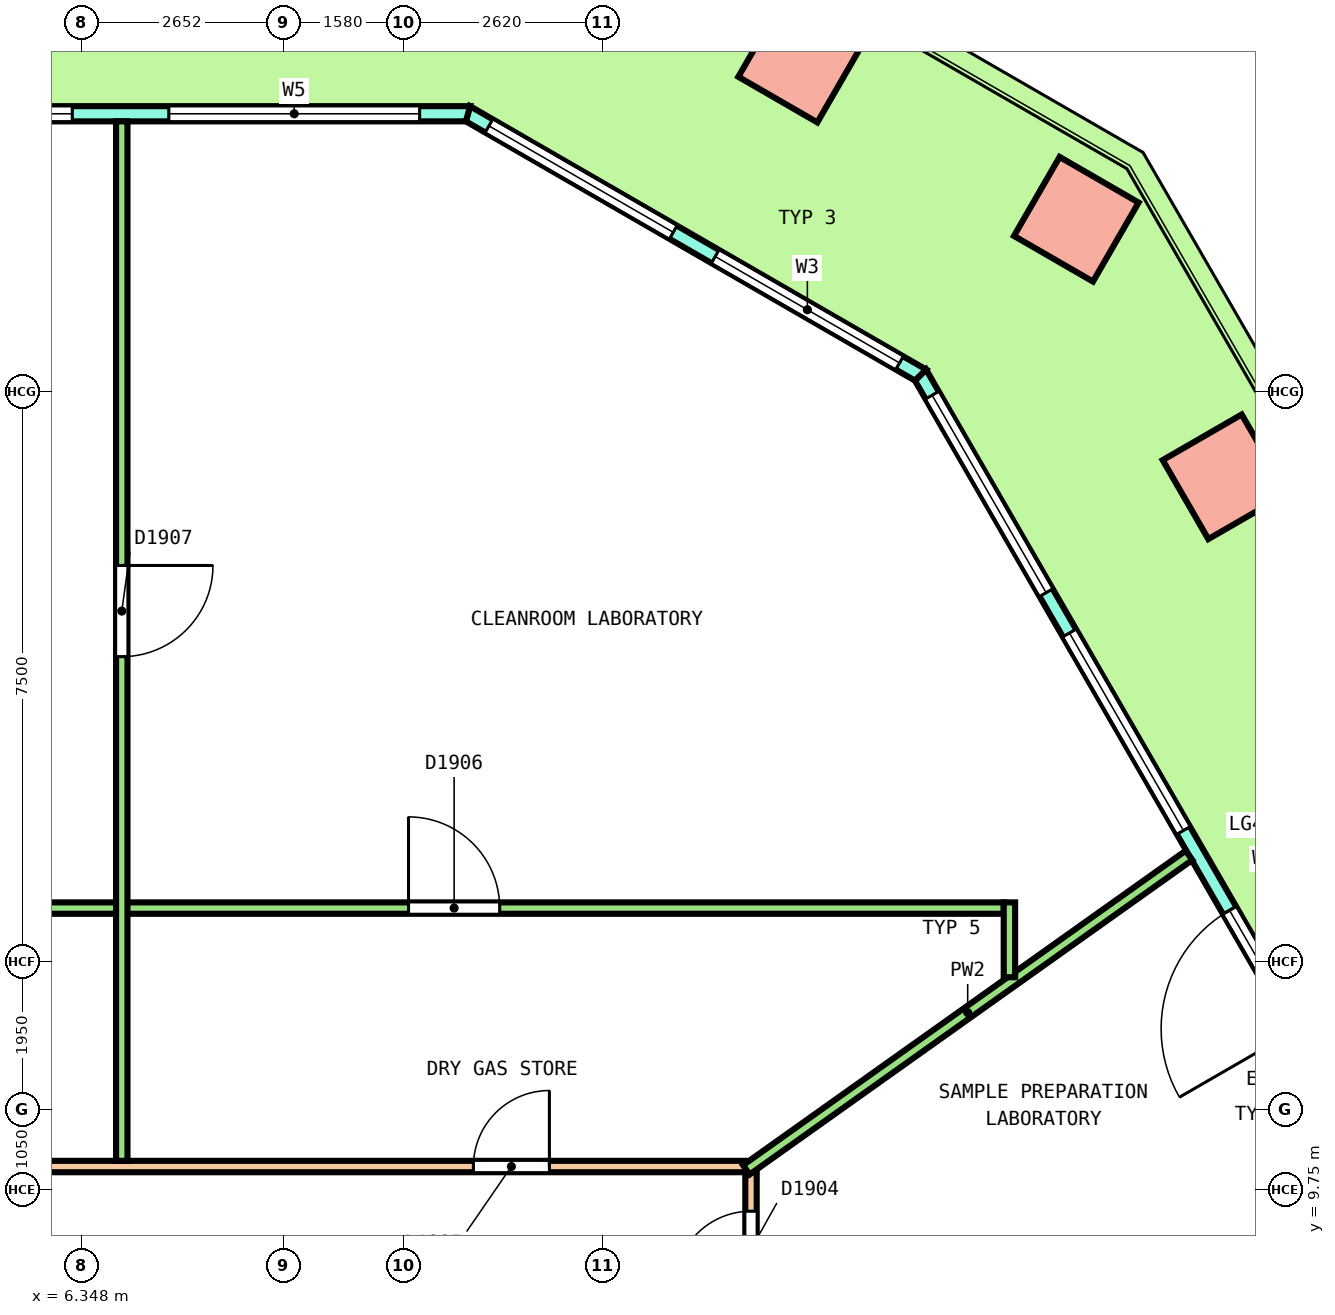
"""IFC4 building model, lengths in metres.
Left out: names, types, materials, properties, quantities, classifications, styles, units other than length and angle.
Written with IfcOpenShell. Run it as: python <this file> out.ifc"""

import sys

from ifc_helpers import new_model, si_unit, direction, frame, frame_2d, origin, origin_2d, place, context, subcontext, project, spatial, polyline, rectangle, outline, extrude, element, fill, save


model = new_model("IFC4")
c1 = context("Model", 3, precision=1e-05, world=origin(), true_north=direction((0.0, 1.0)))
c2 = subcontext(c1, "Body", "Model", "MODEL_VIEW")
j1 = project(units=[si_unit("LENGTHUNIT", "METRE"), si_unit("PLANEANGLEUNIT", "RADIAN")], contexts=[c1])
p1 = place(None, origin())
s1 = spatial("IfcSite", under=j1, at=p1, CompositionType="ELEMENT")
p2 = place(p1, origin())
s2 = spatial("IfcBuilding", under=s1, at=p2, CompositionType="ELEMENT")
p3 = place(p2, frame((0.0, 0.0, 193.6)))
s3 = spatial("IfcBuildingStorey", under=s2, at=p3, CompositionType="ELEMENT", Elevation=193.6)
for number, where, z_axis, x_axis in (
    (1, (21.386, 19.124, 0.0), (0.0, 0.0, 1.0), (-0.5, 0.866, 0.0)),
    (2, (19.43, 22.512, 0.0), (0.0, 0.0, 1.0), (-0.866, 0.5, 0.0)),
    (3, (15.803, 24.606, 0.0), (0.0, 0.0, 1.0), (-0.866, 0.5, 0.0)),
):
    element("IfcColumn", number, at=place(p3, frame(where, z_axis=z_axis, x_axis=x_axis)), inside=s3, PredefinedType="COLUMN", context=c2, shape_type="SweptSolid", body=[
        extrude(rectangle(XDim=1.2, YDim=1.2, at=origin_2d()), origin(), (0.0, 0.0, 1.0), 4.04),
    ])
p4 = place(p3, frame((26.411, 4.82, 0.0), z_axis=(0.0, 0.0, 1.0), x_axis=(-0.500000137386, 0.866025324465, 0.0)))
e4 = element("IfcWall", 4, at=p4, inside=s3, PredefinedType="SOLIDWALL", context=c2, shape_type="SweptSolid", body=[
    extrude(outline(polyline([(-0.027, -0.1), (0.979, -0.1), (1.986, -0.1), (2.992, -0.1), (3.999, -0.1), (5.005, -0.1), (6.012, -0.1), (7.018, -0.1), (8.025, -0.1), (9.031, -0.1), (10.038, -0.1), (11.044, -0.1), (12.051, -0.1), (13.057, -0.1), (14.063, -0.1), (15.07, -0.1), (16.076, -0.1), (17.083, -0.1), (18.089, -0.1), (18.036, 0.1), (17.035, 0.1), (16.035, 0.1), (15.034, 0.1), (14.034, 0.1), (13.033, 0.1), (12.033, 0.1), (11.032, 0.1), (10.032, 0.1), (9.031, 0.1), (8.031, 0.1), (7.03, 0.1), (6.03, 0.1), (5.029, 0.1), (4.029, 0.1), (3.028, 0.1), (2.028, 0.1), (1.027, 0.1), (0.027, 0.1), (-0.027, -0.1)])), origin(), (0.0, 0.0, 1.0), 4.1),
])
p5 = place(p4, frame((0.306, 0.0, 0.1)))
e5 = element("IfcOpeningElement", 5, at=p5, cuts=e4, PredefinedType="OPENING", context=c2, shape_type="SweptSolid", body=[
    extrude(rectangle(XDim=3.0, YDim=2.9, at=frame_2d((1.5, 1.45))), frame((0.0, 0.11, 0.0), z_axis=(0.0, -1.0, 0.0), x_axis=(1.0, 0.0, 0.0)), (0.0, 0.0, 1.0), 0.22),
])
p6 = place(p4, frame((3.919, 0.0, 0.1)))
e6 = element("IfcOpeningElement", 6, at=p6, cuts=e4, PredefinedType="OPENING", context=c2, shape_type="SweptSolid", body=[
    extrude(rectangle(XDim=3.0, YDim=2.9, at=frame_2d((1.5, 1.45))), frame((0.0, 0.11, 0.0), z_axis=(0.0, -1.0, 0.0), x_axis=(1.0, 0.0, 0.0)), (0.0, 0.0, 1.0), 0.22),
])
p7 = place(p4, frame((8.131, 0.0, 0.0)))
e7 = element("IfcOpeningElement", 7, at=p7, cuts=e4, PredefinedType="OPENING", context=c2, shape_type="SweptSolid", body=[
    extrude(rectangle(XDim=1.8, YDim=2.4, at=frame_2d((0.9, 1.2))), frame((0.0, 0.11, 0.0), z_axis=(0.0, -1.0, 0.0), x_axis=(1.0, 0.0, 0.0)), (0.0, 0.0, 1.0), 0.22),
])
p8 = place(p4, frame((8.131, 0.0, 2.55)))
e8 = element("IfcOpeningElement", 8, at=p8, cuts=e4, PredefinedType="OPENING", context=c2, shape_type="SweptSolid", body=[
    extrude(rectangle(XDim=1.8, YDim=0.45, at=frame_2d((0.9, 0.225))), frame((0.0, 0.11, 0.0), z_axis=(0.0, -1.0, 0.0), x_axis=(1.0, 0.0, 0.0)), (0.0, 0.0, 1.0), 0.22),
])
p9 = place(p4, frame((11.144, 0.0, 0.1)))
e9 = element("IfcOpeningElement", 9, at=p9, cuts=e4, PredefinedType="OPENING", context=c2, shape_type="SweptSolid", body=[
    extrude(rectangle(XDim=3.0, YDim=2.9, at=frame_2d((1.5, 1.45))), frame((0.0, 0.11, 0.0), z_axis=(0.0, -1.0, 0.0), x_axis=(1.0, 0.0, 0.0)), (0.0, 0.0, 1.0), 0.22),
])
p10 = place(p4, frame((14.756, 0.0, 0.1)))
e10 = element("IfcOpeningElement", 10, at=p10, cuts=e4, PredefinedType="OPENING", context=c2, shape_type="SweptSolid", body=[
    extrude(rectangle(XDim=3.0, YDim=2.9, at=frame_2d((1.5, 1.45))), frame((0.0, 0.11, 0.0), z_axis=(0.0, -1.0, 0.0), x_axis=(1.0, 0.0, 0.0)), (0.0, 0.0, 1.0), 0.22),
])
p11 = place(p3, frame((17.38, 20.463, 0.0), z_axis=(0.0, 0.0, 1.0), x_axis=(-0.866029458321, 0.49999297727, 0.0)))
e11 = element("IfcWall", 11, at=p11, inside=s3, PredefinedType="SOLIDWALL", context=c2, shape_type="SweptSolid", body=[
    extrude(outline(polyline([(-0.027, -0.1), (1.128, -0.1), (2.282, -0.1), (3.437, -0.1), (4.592, -0.1), (5.747, -0.1), (6.901, -0.1), (6.848, 0.1), (5.711, 0.1), (4.574, 0.1), (3.437, 0.1), (2.301, 0.1), (1.164, 0.1), (0.027, 0.1), (-0.027, -0.1)])), origin(), (0.0, 0.0, 1.0), 4.1),
])
p12 = place(p11, frame((0.319, 0.0, 0.1)))
e12 = element("IfcOpeningElement", 12, at=p12, cuts=e11, PredefinedType="OPENING", context=c2, shape_type="SweptSolid", body=[
    extrude(rectangle(XDim=2.8, YDim=2.9, at=frame_2d((1.4, 1.45))), frame((0.0, 0.11, 0.0), z_axis=(0.0, -1.0, 0.0), x_axis=(1.0, 0.0, 0.0)), (0.0, 0.0, 1.0), 0.22),
])
p13 = place(p11, frame((3.756, 0.0, 0.1)))
e13 = element("IfcOpeningElement", 13, at=p13, cuts=e11, PredefinedType="OPENING", context=c2, shape_type="SweptSolid", body=[
    extrude(rectangle(XDim=2.8, YDim=2.9, at=frame_2d((1.4, 1.45))), frame((0.0, 0.11, 0.0), z_axis=(0.0, -1.0, 0.0), x_axis=(1.0, 0.0, 0.0)), (0.0, 0.0, 1.0), 0.22),
])
p14 = place(p3, frame((11.426, 23.9, 0.0), z_axis=(0.0, 0.0, 1.0), x_axis=(-1.0, 0.0, 0.0)))
e14 = element("IfcWall", 14, at=p14, inside=s3, PredefinedType="SOLIDWALL", context=c2, shape_type="SweptSolid", body=[
    extrude(outline(polyline([(-0.027, -0.1), (1.014, -0.1), (2.055, -0.1), (3.097, -0.1), (4.138, -0.1), (5.179, -0.1), (6.22, -0.1), (7.261, -0.1), (8.303, -0.1), (9.344, -0.1), (10.385, -0.1), (11.426, -0.1), (12.468, -0.1), (13.509, -0.1), (14.55, -0.1), (15.591, -0.1), (16.632, -0.1), (17.673, -0.1), (18.715, -0.1), (19.756, -0.1), (20.797, -0.1), (21.838, -0.1), (22.879, -0.1), (22.826, 0.1), (21.789, 0.1), (20.753, 0.1), (19.717, 0.1), (18.68, 0.1), (17.644, 0.1), (16.608, 0.1), (15.572, 0.1), (14.535, 0.1), (13.499, 0.1), (12.463, 0.1), (11.426, 0.1), (10.39, 0.1), (9.354, 0.1), (8.317, 0.1), (7.281, 0.1), (6.245, 0.1), (5.208, 0.1), (4.172, 0.1), (3.136, 0.1), (2.099, 0.1), (1.063, 0.1), (0.027, 0.1), (-0.027, -0.1)])), origin(), (0.0, 0.0, 1.0), 4.1),
])
p15 = place(p14, frame((0.635, 0.0, 0.1)))
e15 = element("IfcOpeningElement", 15, at=p15, cuts=e14, PredefinedType="OPENING", context=c2, shape_type="SweptSolid", body=[
    extrude(rectangle(XDim=3.3, YDim=2.9, at=frame_2d((1.65, 1.45))), frame((0.0, 0.11, 0.0), z_axis=(0.0, -1.0, 0.0), x_axis=(1.0, 0.0, 0.0)), (0.0, 0.0, 1.0), 0.22),
])
p16 = place(p14, frame((5.206, 0.0, 0.1)))
e16 = element("IfcOpeningElement", 16, at=p16, cuts=e14, PredefinedType="OPENING", context=c2, shape_type="SweptSolid", body=[
    extrude(rectangle(XDim=3.3, YDim=2.9, at=frame_2d((1.65, 1.45))), frame((0.0, 0.11, 0.0), z_axis=(0.0, -1.0, 0.0), x_axis=(1.0, 0.0, 0.0)), (0.0, 0.0, 1.0), 0.22),
])
p17 = place(p14, frame((10.526, 0.0, 0.0)))
e17 = element("IfcOpeningElement", 17, at=p17, cuts=e14, PredefinedType="OPENING", context=c2, shape_type="SweptSolid", body=[
    extrude(rectangle(XDim=1.8, YDim=2.4, at=frame_2d((0.9, 1.2))), frame((0.0, 0.11, 0.0), z_axis=(0.0, -1.0, 0.0), x_axis=(1.0, 0.0, 0.0)), (0.0, 0.0, 1.0), 0.22),
])
p18 = place(p14, frame((10.526, 0.0, 2.55)))
e18 = element("IfcOpeningElement", 18, at=p18, cuts=e14, PredefinedType="OPENING", context=c2, shape_type="SweptSolid", body=[
    extrude(rectangle(XDim=1.8, YDim=0.45, at=frame_2d((0.9, 0.225))), frame((0.0, 0.11, 0.0), z_axis=(0.0, -1.0, 0.0), x_axis=(1.0, 0.0, 0.0)), (0.0, 0.0, 1.0), 0.22),
])
p19 = place(p14, frame((14.347, 0.0, 0.1)))
e19 = element("IfcOpeningElement", 19, at=p19, cuts=e14, PredefinedType="OPENING", context=c2, shape_type="SweptSolid", body=[
    extrude(rectangle(XDim=3.3, YDim=2.9, at=frame_2d((1.65, 1.45))), frame((0.0, 0.11, 0.0), z_axis=(0.0, -1.0, 0.0), x_axis=(1.0, 0.0, 0.0)), (0.0, 0.0, 1.0), 0.22),
])
p20 = place(p14, frame((18.917, 0.0, 0.1)))
e20 = element("IfcOpeningElement", 20, at=p20, cuts=e14, PredefinedType="OPENING", context=c2, shape_type="SweptSolid", body=[
    extrude(rectangle(XDim=3.3, YDim=2.9, at=frame_2d((1.65, 1.45))), frame((0.0, 0.11, 0.0), z_axis=(0.0, -1.0, 0.0), x_axis=(1.0, 0.0, 0.0)), (0.0, 0.0, 1.0), 0.22),
])
p21 = place(p3, frame((15.15, 0.576, 0.0), z_axis=(0.0, 0.0, 1.0), x_axis=(0.0, 1.0, 0.0)))
e21 = element("IfcWall", 21, at=p21, inside=s3, PredefinedType="PARTITIONING", context=c2, shape_type="SweptSolid", body=[
    extrude(rectangle(XDim=9.399, YDim=0.15, at=frame_2d((4.7, 0.0))), origin(), (0.0, 0.0, 1.0), 3.05),
])
p22 = place(p21, frame((7.887, 0.0, 0.0)))
e22 = element("IfcOpeningElement", 22, at=p22, cuts=e21, PredefinedType="OPENING", context=c2, shape_type="SweptSolid", body=[
    extrude(rectangle(XDim=1.0, YDim=2.1, at=frame_2d((0.5, 1.05))), frame((0.0, 0.085, 0.0), z_axis=(0.0, -1.0, 0.0), x_axis=(1.0, 0.0, 0.0)), (0.0, 0.0, 1.0), 0.17),
])
p23 = place(p3, frame((-15.075, 10.05, 0.0), z_axis=(0.0, 0.0, 1.0), x_axis=(1.0, 0.0, 0.0)))
e23 = element("IfcWall", 23, at=p23, inside=s3, PredefinedType="PARTITIONING", context=c2, shape_type="SweptSolid", body=[
    extrude(rectangle(XDim=30.15, YDim=0.15, at=frame_2d((15.075, 0.0))), origin(), (0.0, 0.0, 1.0), 3.05),
])
p24 = place(p23, frame((26.573, 0.0, 0.0)))
e24 = element("IfcOpeningElement", 24, at=p24, cuts=e23, PredefinedType="OPENING", context=c2, shape_type="SweptSolid", body=[
    extrude(rectangle(XDim=1.0, YDim=2.1, at=frame_2d((0.5, 1.05))), frame((0.0, 0.085, 0.0), z_axis=(0.0, -1.0, 0.0), x_axis=(1.0, 0.0, 0.0)), (0.0, 0.0, 1.0), 0.17),
])
p25 = place(p23, frame((10.684, 0.0, 0.0)))
e25 = element("IfcOpeningElement", 25, at=p25, cuts=e23, PredefinedType="OPENING", context=c2, shape_type="SweptSolid", body=[
    extrude(rectangle(XDim=1.2, YDim=2.1, at=frame_2d((0.6, 1.05))), frame((0.0, 0.085, 0.0), z_axis=(0.0, -1.0, 0.0), x_axis=(1.0, 0.0, 0.0)), (0.0, 0.0, 1.0), 0.17),
])
p26 = place(p3, frame((15.089, 10.007, 0.0), z_axis=(0.0, 0.0, 1.0), x_axis=(0.815227116073, 0.579141389661, 0.0)))
e26 = element("IfcWall", 26, at=p26, inside=s3, PredefinedType="PARTITIONING", context=c2, shape_type="SweptSolid", body=[
    extrude(rectangle(XDim=7.144, YDim=0.15, at=frame_2d((3.572, 0.0))), origin(), (0.0, 0.0, 1.0), 3.05),
])
p27 = place(p3, frame((-16.979, 13.45, 0.0), z_axis=(0.0, 0.0, 1.0), x_axis=(1.0, 0.0, 0.0)))
e27 = element("IfcWall", 27, at=p27, inside=s3, PredefinedType="PARTITIONING", context=c2, shape_type="SweptSolid", body=[
    extrude(rectangle(XDim=35.454, YDim=0.15, at=frame_2d((17.727, 0.0))), origin(), (0.0, 0.0, 1.0), 3.05),
])
p28 = place(p27, frame((27.623, 0.0, 0.0)))
e28 = element("IfcOpeningElement", 28, at=p28, cuts=e27, PredefinedType="OPENING", context=c2, shape_type="SweptSolid", body=[
    extrude(rectangle(XDim=1.2, YDim=2.1, at=frame_2d((0.6, 1.05))), frame((0.0, 0.085, 0.0), z_axis=(0.0, -1.0, 0.0), x_axis=(1.0, 0.0, 0.0)), (0.0, 0.0, 1.0), 0.17),
])
p29 = place(p3, frame((18.55, 12.541, 0.0), z_axis=(0.0, 0.0, 1.0), x_axis=(0.0, 1.0, 0.0)))
e29 = element("IfcWall", 29, at=p29, inside=s3, PredefinedType="PARTITIONING", context=c2, shape_type="SweptSolid", body=[
    extrude(rectangle(XDim=0.984, YDim=0.15, at=frame_2d((0.492, 0.0))), origin(), (0.0, 0.0, 1.0), 3.05),
])
p30 = place(p3, frame((6.872, 10.125, 0.0), z_axis=(0.0, 0.0, 1.0), x_axis=(0.0, 1.0, 0.0)))
e30 = element("IfcWall", 30, at=p30, inside=s3, PredefinedType="PARTITIONING", context=c2, shape_type="SweptSolid", body=[
    extrude(rectangle(XDim=13.675, YDim=0.15, at=frame_2d((6.837, 0.0))), origin(), (0.0, 0.0, 1.0), 3.05),
])
p31 = place(p30, frame((6.633, 0.0, 0.0)))
e31 = element("IfcOpeningElement", 31, at=p31, cuts=e30, PredefinedType="OPENING", context=c2, shape_type="SweptSolid", body=[
    extrude(rectangle(XDim=1.2, YDim=2.1, at=frame_2d((0.6, 1.05))), frame((0.0, 0.085, 0.0), z_axis=(0.0, -1.0, 0.0), x_axis=(1.0, 0.0, 0.0)), (0.0, 0.0, 1.0), 0.17),
])
p32 = place(p7, origin())
e32 = element("IfcDoor", 32, at=p32, inside=s3, OperationType="DOUBLE_DOOR_SINGLE_SWING", PredefinedType="DOOR", context=c2, shape_type="SweptSolid", body=[
    extrude(rectangle(XDim=1.8, YDim=2.4, at=frame_2d((0.9, 1.2))), frame((0.0, 0.025, 0.0), z_axis=(0.0, -1.0, 0.0), x_axis=(1.0, 0.0, 0.0)), (0.0, 0.0, 1.0), 0.05),
])
fill(e7, e32)
p33 = place(p8, origin())
e33 = element("IfcWindow", 33, at=p33, inside=s3, PartitioningType="SINGLE_PANEL", PredefinedType="WINDOW", context=c2, shape_type="SweptSolid", body=[
    extrude(rectangle(XDim=1.8, YDim=0.45, at=frame_2d((0.9, 0.225))), frame((0.0, 0.03, 0.0), z_axis=(0.0, -1.0, 0.0), x_axis=(1.0, 0.0, 0.0)), (0.0, 0.0, 1.0), 0.06),
])
fill(e8, e33)
p34 = place(p9, origin())
e34 = element("IfcWindow", 34, at=p34, inside=s3, PartitioningType="SINGLE_PANEL", PredefinedType="WINDOW", context=c2, shape_type="SweptSolid", body=[
    extrude(rectangle(XDim=3.0, YDim=2.9, at=frame_2d((1.5, 1.45))), frame((0.0, 0.03, 0.0), z_axis=(0.0, -1.0, 0.0), x_axis=(1.0, 0.0, 0.0)), (0.0, 0.0, 1.0), 0.06),
])
fill(e9, e34)
p35 = place(p10, origin())
e35 = element("IfcWindow", 35, at=p35, inside=s3, PartitioningType="SINGLE_PANEL", PredefinedType="WINDOW", context=c2, shape_type="SweptSolid", body=[
    extrude(rectangle(XDim=3.0, YDim=2.9, at=frame_2d((1.5, 1.45))), frame((0.0, 0.03, 0.0), z_axis=(0.0, -1.0, 0.0), x_axis=(1.0, 0.0, 0.0)), (0.0, 0.0, 1.0), 0.06),
])
fill(e10, e35)
p36 = place(p12, origin())
e36 = element("IfcWindow", 36, at=p36, inside=s3, PartitioningType="SINGLE_PANEL", PredefinedType="WINDOW", context=c2, shape_type="SweptSolid", body=[
    extrude(rectangle(XDim=2.8, YDim=2.9, at=frame_2d((1.4, 1.45))), frame((0.0, 0.03, 0.0), z_axis=(0.0, -1.0, 0.0), x_axis=(1.0, 0.0, 0.0)), (0.0, 0.0, 1.0), 0.06),
])
fill(e12, e36)
p37 = place(p13, origin())
e37 = element("IfcWindow", 37, at=p37, inside=s3, PartitioningType="SINGLE_PANEL", PredefinedType="WINDOW", context=c2, shape_type="SweptSolid", body=[
    extrude(rectangle(XDim=2.8, YDim=2.9, at=frame_2d((1.4, 1.45))), frame((0.0, 0.03, 0.0), z_axis=(0.0, -1.0, 0.0), x_axis=(1.0, 0.0, 0.0)), (0.0, 0.0, 1.0), 0.06),
])
fill(e13, e37)
p38 = place(p15, origin())
e38 = element("IfcWindow", 38, at=p38, inside=s3, PartitioningType="SINGLE_PANEL", PredefinedType="WINDOW", context=c2, shape_type="SweptSolid", body=[
    extrude(rectangle(XDim=3.3, YDim=2.9, at=frame_2d((1.65, 1.45))), frame((0.0, 0.03, 0.0), z_axis=(0.0, -1.0, 0.0), x_axis=(1.0, 0.0, 0.0)), (0.0, 0.0, 1.0), 0.06),
])
fill(e15, e38)
p39 = place(p16, origin())
e39 = element("IfcWindow", 39, at=p39, inside=s3, PartitioningType="SINGLE_PANEL", PredefinedType="WINDOW", context=c2, shape_type="SweptSolid", body=[
    extrude(rectangle(XDim=3.3, YDim=2.9, at=frame_2d((1.65, 1.45))), frame((0.0, 0.03, 0.0), z_axis=(0.0, -1.0, 0.0), x_axis=(1.0, 0.0, 0.0)), (0.0, 0.0, 1.0), 0.06),
])
fill(e16, e39)
p40 = place(p22, origin())
e40 = element("IfcDoor", 40, at=p40, inside=s3, OperationType="SINGLE_SWING_RIGHT", PredefinedType="DOOR", context=c2, shape_type="SweptSolid", body=[
    extrude(rectangle(XDim=1.0, YDim=2.1, at=frame_2d((0.5, 1.05))), frame((0.0, 0.025, 0.0), z_axis=(0.0, -1.0, 0.0), x_axis=(1.0, 0.0, 0.0)), (0.0, 0.0, 1.0), 0.05),
])
fill(e22, e40)
p41 = place(p24, origin())
e41 = element("IfcDoor", 41, at=p41, inside=s3, OperationType="SINGLE_SWING_LEFT", PredefinedType="DOOR", context=c2, shape_type="SweptSolid", body=[
    extrude(rectangle(XDim=1.0, YDim=2.1, at=frame_2d((0.5, 1.05))), frame((0.0, 0.025, 0.0), z_axis=(0.0, -1.0, 0.0), x_axis=(1.0, 0.0, 0.0)), (0.0, 0.0, 1.0), 0.05),
])
fill(e24, e41)
p42 = place(p28, origin())
e42 = element("IfcDoor", 42, at=p42, inside=s3, OperationType="DOUBLE_DOOR_SINGLE_SWING", PredefinedType="DOOR", context=c2, shape_type="SweptSolid", body=[
    extrude(rectangle(XDim=1.2, YDim=2.1, at=frame_2d((0.6, 1.05))), frame((0.0, 0.025, 0.0), z_axis=(0.0, -1.0, 0.0), x_axis=(1.0, 0.0, 0.0)), (0.0, 0.0, 1.0), 0.05),
])
fill(e28, e42)
p43 = place(p31, origin())
e43 = element("IfcDoor", 43, at=p43, inside=s3, OperationType="DOUBLE_DOOR_SINGLE_SWING", PredefinedType="DOOR", context=c2, shape_type="SweptSolid", body=[
    extrude(rectangle(XDim=1.2, YDim=2.1, at=frame_2d((0.6, 1.05))), frame((0.0, 0.025, 0.0), z_axis=(0.0, -1.0, 0.0), x_axis=(1.0, 0.0, 0.0)), (0.0, 0.0, 1.0), 0.05),
])
fill(e31, e43)
save(model, sys.argv[1])
